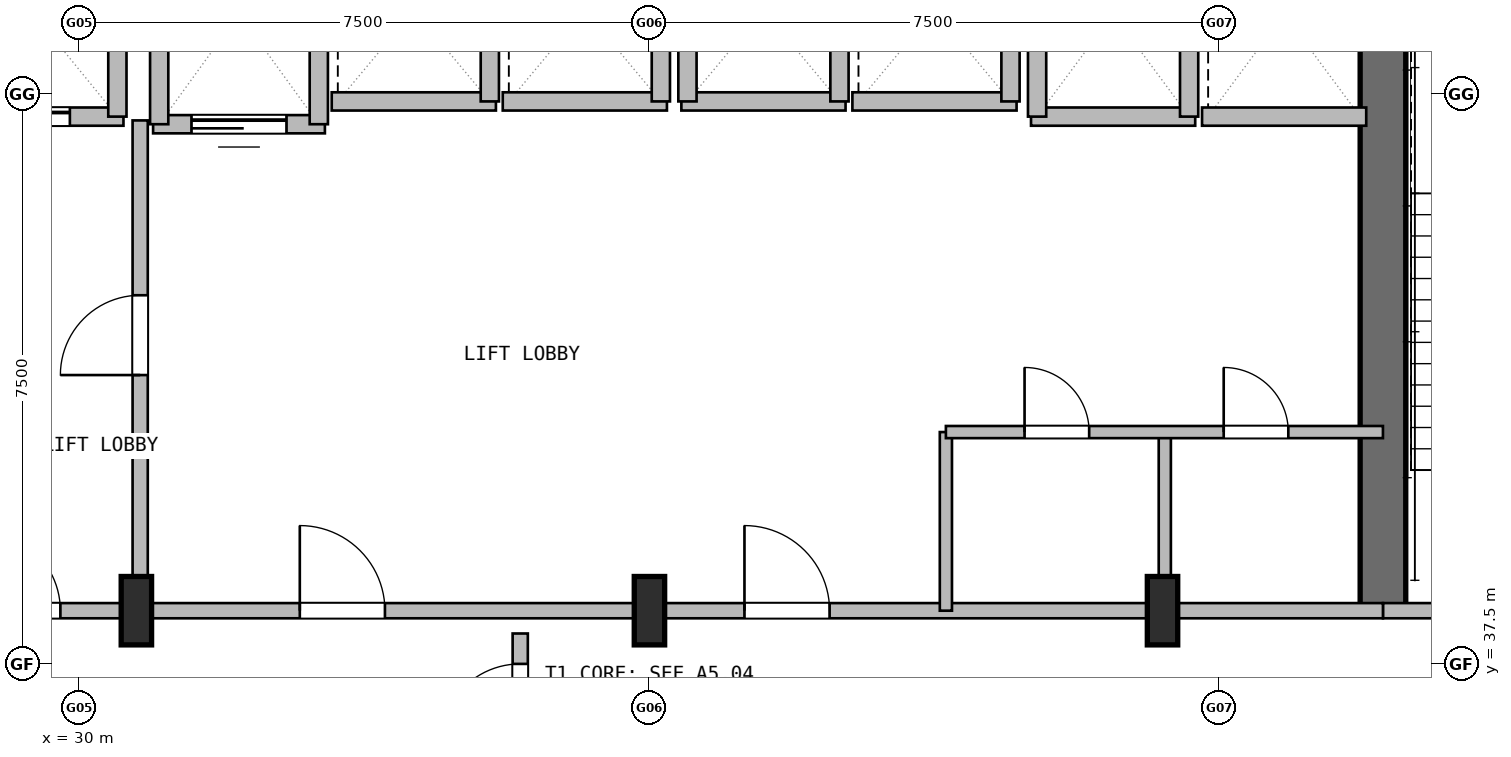
"""IFC4 building model, lengths in metres.
Left out: names, types, materials, properties, quantities, classifications, styles, units other than length and angle.
Written with IfcOpenShell. Run it as: python <this file> out.ifc"""

import sys

from ifc_helpers import new_model, si_unit, direction, frame, frame_2d, origin, origin_2d, place, context, subcontext, project, spatial, rectangle, i_section, extrude, element, fill, save


model = new_model("IFC4")
c1 = context("Model", 3, precision=1e-05, world=origin(), true_north=direction((0.0, 1.0)))
c2 = subcontext(c1, "Body", "Model", "MODEL_VIEW")
j1 = project(units=[si_unit("LENGTHUNIT", "METRE"), si_unit("PLANEANGLEUNIT", "RADIAN")], contexts=[c1])
p1 = place(None, origin())
s1 = spatial("IfcSite", under=j1, at=p1, CompositionType="ELEMENT")
p2 = place(p1, origin())
s2 = spatial("IfcBuilding", under=s1, at=p2, CompositionType="ELEMENT")
p3 = place(p2, frame((0.0, 0.0, 81.9)))
s3 = spatial("IfcBuildingStorey", under=s2, at=p3, CompositionType="ELEMENT", Elevation=81.9)
p4 = place(p3, frame((47.15, 38.2, 0.0), z_axis=(0.0, 0.0, 1.0), x_axis=(0.0, 1.0, 0.0)))
e1 = element("IfcWall", 1, at=p4, inside=s3, PredefinedType="SHEAR", context=c2, shape_type="SweptSolid", body=[
    extrude(rectangle(XDim=9.8, YDim=0.6, at=frame_2d((4.9, 0.0))), origin(), (0.0, 0.0, 1.0), 4.8),
])
for number, where, z_axis, x_axis in (
    (2, (30.75, 38.2, 0.0), (0.0, 0.0, 1.0), (1.0, 0.0, 0.0)),
    (3, (37.5, 38.2, 0.0), (0.0, 0.0, 1.0), (1.0, 0.0, 0.0)),
    (4, (44.25, 38.2, 0.0), (0.0, 0.0, 1.0), (1.0, 0.0, 0.0)),
):
    element("IfcColumn", number, at=place(p3, frame(where, z_axis=z_axis, x_axis=x_axis)), inside=s3, PredefinedType="COLUMN", context=c2, shape_type="SweptSolid", body=[
        extrude(i_section(OverallWidth=0.4, OverallDepth=0.9, WebThickness=0.02, FlangeThickness=0.036, at=origin_2d()), origin(), (0.0, 0.0, 1.0), 4.8),
    ])
p5 = place(p3, frame((47.15, 38.2, 0.0), z_axis=(0.0, 0.0, 1.0), x_axis=(1.0, 0.0, 0.0)))
e5 = element("IfcWall", 5, at=p5, inside=s3, PredefinedType="PARTITIONING", context=c2, shape_type="SweptSolid", body=[
    extrude(rectangle(XDim=3.85, YDim=0.2, at=frame_2d((1.925, 0.0))), origin(), (0.0, 0.0, 1.0), 3.83),
])
p6 = place(p5, frame((0.75, 0.0, 0.0)))
e6 = element("IfcOpeningElement", 6, at=p6, cuts=e5, PredefinedType="OPENING", context=c2, shape_type="SweptSolid", body=[
    extrude(rectangle(XDim=1.12, YDim=2.1, at=frame_2d((0.56, 1.05))), frame((0.0, 0.11, 0.0), z_axis=(0.0, -1.0, 0.0), x_axis=(1.0, 0.0, 0.0)), (0.0, 0.0, 1.0), 0.22),
])
p7 = place(p3, frame((30.8, 38.2, 0.0), z_axis=(0.0, 0.0, 1.0), x_axis=(0.0, 1.0, 0.0)))
e7 = element("IfcWall", 7, at=p7, inside=s3, PredefinedType="PARTITIONING", context=c2, shape_type="SweptSolid", body=[
    extrude(rectangle(XDim=6.45, YDim=0.2, at=frame_2d((3.225, 0.0))), origin(), (0.0, 0.0, 1.0), 3.83),
])
p8 = place(p7, frame((3.1, 0.0, 0.0)))
e8 = element("IfcOpeningElement", 8, at=p8, cuts=e7, PredefinedType="OPENING", context=c2, shape_type="SweptSolid", body=[
    extrude(rectangle(XDim=1.05, YDim=2.1, at=frame_2d((0.525, 1.05))), frame((0.0, 0.11, 0.0), z_axis=(0.0, -1.0, 0.0), x_axis=(1.0, 0.0, 0.0)), (0.0, 0.0, 1.0), 0.22),
])
p9 = place(p3, frame((27.95, 38.2, 0.0), z_axis=(0.0, 0.0, 1.0), x_axis=(1.0, 0.0, 0.0)))
e9 = element("IfcWall", 9, at=p9, inside=s3, PredefinedType="PARTITIONING", context=c2, shape_type="SweptSolid", body=[
    extrude(rectangle(XDim=2.85, YDim=0.2, at=frame_2d((1.425, 0.0))), origin(), (0.0, 0.0, 1.0), 3.83),
])
p10 = place(p9, frame((0.75, 0.0, 0.0)))
e10 = element("IfcOpeningElement", 10, at=p10, cuts=e9, PredefinedType="OPENING", context=c2, shape_type="SweptSolid", body=[
    extrude(rectangle(XDim=1.05, YDim=2.1, at=frame_2d((0.525, 1.05))), frame((0.0, 0.11, 0.0), z_axis=(0.0, -1.0, 0.0), x_axis=(1.0, 0.0, 0.0)), (0.0, 0.0, 1.0), 0.22),
])
p11 = place(p3, frame((30.8, 38.2, 0.0), z_axis=(0.0, 0.0, 1.0), x_axis=(1.0, 0.0, 0.0)))
e11 = element("IfcWall", 11, at=p11, inside=s3, PredefinedType="PARTITIONING", context=c2, shape_type="SweptSolid", body=[
    extrude(rectangle(XDim=16.35, YDim=0.2, at=frame_2d((8.175, 0.0))), origin(), (0.0, 0.0, 1.0), 3.83),
])
p12 = place(p11, frame((2.1, 0.0, 0.0)))
e12 = element("IfcOpeningElement", 12, at=p12, cuts=e11, PredefinedType="OPENING", context=c2, shape_type="SweptSolid", body=[
    extrude(rectangle(XDim=1.12, YDim=2.1, at=frame_2d((0.56, 1.05))), frame((0.0, 0.11, 0.0), z_axis=(0.0, -1.0, 0.0), x_axis=(1.0, 0.0, 0.0)), (0.0, 0.0, 1.0), 0.22),
])
p13 = place(p11, frame((7.95, 0.0, 0.0)))
e13 = element("IfcOpeningElement", 13, at=p13, cuts=e11, PredefinedType="OPENING", context=c2, shape_type="SweptSolid", body=[
    extrude(rectangle(XDim=1.12, YDim=2.1, at=frame_2d((0.56, 1.05))), frame((0.0, 0.11, 0.0), z_axis=(0.0, -1.0, 0.0), x_axis=(1.0, 0.0, 0.0)), (0.0, 0.0, 1.0), 0.22),
])
p14 = place(p3, frame((28.22, 44.7, 0.0), z_axis=(0.0, 0.0, 1.0), x_axis=(1.0, 0.0, 0.0)))
e14 = element("IfcWall", 14, at=p14, inside=s3, PredefinedType="PARTITIONING", context=c2, shape_type="SweptSolid", body=[
    extrude(rectangle(XDim=2.36, YDim=0.24, at=frame_2d((1.18, 0.0))), origin(), (0.0, 0.0, 1.0), 4.23),
])
p15 = place(p14, frame((0.705, 0.0, 0.0)))
e15 = element("IfcOpeningElement", 15, at=p15, cuts=e14, PredefinedType="OPENING", context=c2, shape_type="SweptSolid", body=[
    extrude(rectangle(XDim=0.95, YDim=2.15, at=frame_2d((0.475, 1.075))), frame((0.0, 0.13, 0.0), z_axis=(0.0, -1.0, 0.0), x_axis=(1.0, 0.0, 0.0)), (0.0, 0.0, 1.0), 0.26),
])
p16 = place(p3, frame((30.5, 44.7, 0.0), z_axis=(0.0, 0.0, 1.0), x_axis=(0.0, 1.0, 0.0)))
e16 = element("IfcWall", 16, at=p16, inside=s3, PredefinedType="PARTITIONING", context=c2, shape_type="SweptSolid", body=[
    extrude(rectangle(XDim=2.7, YDim=0.24, at=frame_2d((1.35, 0.0))), origin(), (0.0, 0.0, 1.0), 3.83),
])
p17 = place(p3, frame((30.97, 44.6, 0.0), z_axis=(0.0, 0.0, 1.0), x_axis=(1.0, 0.0, 0.0)))
e17 = element("IfcWall", 17, at=p17, inside=s3, PredefinedType="PARTITIONING", context=c2, shape_type="SweptSolid", body=[
    extrude(rectangle(XDim=2.26, YDim=0.24, at=frame_2d((1.13, 0.0))), origin(), (0.0, 0.0, 1.0), 4.53),
])
p18 = place(p17, frame((0.505, 0.0, 0.0)))
e18 = element("IfcOpeningElement", 18, at=p18, cuts=e17, PredefinedType="OPENING", context=c2, shape_type="SweptSolid", body=[
    extrude(rectangle(XDim=1.25, YDim=2.2, at=frame_2d((0.625, 1.1))), frame((0.0, 0.13, 0.0), z_axis=(0.0, -1.0, 0.0), x_axis=(1.0, 0.0, 0.0)), (0.0, 0.0, 1.0), 0.26),
])
for number, where, z_axis, x_axis in (
    (19, (31.05, 44.6, 0.0), (0.0, 0.0, 1.0), (0.0, 1.0, 0.0)),
    (20, (33.15, 44.6, 0.0), (0.0, 0.0, 1.0), (0.0, 1.0, 0.0)),
):
    element("IfcWall", number, at=place(p3, frame(where, z_axis=z_axis, x_axis=x_axis)), inside=s3, PredefinedType="PARTITIONING", context=c2, shape_type="SweptSolid", body=[
        extrude(rectangle(XDim=2.9, YDim=0.24, at=frame_2d((1.45, 0.0))), origin(), (0.0, 0.0, 1.0), 4.53),
    ])
p19 = place(p3, frame((33.32, 44.9, 0.0), z_axis=(0.0, 0.0, 1.0), x_axis=(1.0, 0.0, 0.0)))
e21 = element("IfcWall", 21, at=p19, inside=s3, PredefinedType="PARTITIONING", context=c2, shape_type="SweptSolid", body=[
    extrude(rectangle(XDim=2.16, YDim=0.24, at=frame_2d((1.08, 0.0))), origin(), (0.0, 0.0, 1.0), 4.53),
])
p20 = place(p3, frame((35.4, 44.9, 0.0), z_axis=(0.0, 0.0, 1.0), x_axis=(0.0, 1.0, 0.0)))
e22 = element("IfcWall", 22, at=p20, inside=s3, PredefinedType="PARTITIONING", context=c2, shape_type="SweptSolid", body=[
    extrude(rectangle(XDim=2.4, YDim=0.24, at=frame_2d((1.2, 0.0))), origin(), (0.0, 0.0, 1.0), 4.53),
])
p21 = place(p3, frame((35.57, 44.9, 0.0), z_axis=(0.0, 0.0, 1.0), x_axis=(1.0, 0.0, 0.0)))
e23 = element("IfcWall", 23, at=p21, inside=s3, PredefinedType="PARTITIONING", context=c2, shape_type="SweptSolid", body=[
    extrude(rectangle(XDim=2.16, YDim=0.24, at=frame_2d((1.08, 0.0))), origin(), (0.0, 0.0, 1.0), 4.53),
])
p22 = place(p3, frame((37.65, 44.9, 0.0), z_axis=(0.0, 0.0, 1.0), x_axis=(0.0, 1.0, 0.0)))
e24 = element("IfcWall", 24, at=p22, inside=s3, PredefinedType="PARTITIONING", context=c2, shape_type="SweptSolid", body=[
    extrude(rectangle(XDim=2.4, YDim=0.24, at=frame_2d((1.2, 0.0))), origin(), (0.0, 0.0, 1.0), 4.53),
])
p23 = place(p3, frame((37.92, 44.9, 0.0), z_axis=(0.0, 0.0, 1.0), x_axis=(1.0, 0.0, 0.0)))
e25 = element("IfcWall", 25, at=p23, inside=s3, PredefinedType="PARTITIONING", context=c2, shape_type="SweptSolid", body=[
    extrude(rectangle(XDim=2.16, YDim=0.24, at=frame_2d((1.08, 0.0))), origin(), (0.0, 0.0, 1.0), 4.53),
])
for number, where, z_axis, x_axis in (
    (26, (38.0, 44.9, 0.0), (0.0, 0.0, 1.0), (0.0, 1.0, 0.0)),
    (27, (40.0, 44.9, 0.0), (0.0, 0.0, 1.0), (0.0, 1.0, 0.0)),
):
    element("IfcWall", number, at=place(p3, frame(where, z_axis=z_axis, x_axis=x_axis)), inside=s3, PredefinedType="PARTITIONING", context=c2, shape_type="SweptSolid", body=[
        extrude(rectangle(XDim=2.4, YDim=0.24, at=frame_2d((1.2, 0.0))), origin(), (0.0, 0.0, 1.0), 4.53),
    ])
p24 = place(p3, frame((40.17, 44.9, 0.0), z_axis=(0.0, 0.0, 1.0), x_axis=(1.0, 0.0, 0.0)))
e28 = element("IfcWall", 28, at=p24, inside=s3, PredefinedType="PARTITIONING", context=c2, shape_type="SweptSolid", body=[
    extrude(rectangle(XDim=2.16, YDim=0.24, at=frame_2d((1.08, 0.0))), origin(), (0.0, 0.0, 1.0), 4.53),
])
p25 = place(p3, frame((42.25, 44.9, 0.0), z_axis=(0.0, 0.0, 1.0), x_axis=(0.0, 1.0, 0.0)))
e29 = element("IfcWall", 29, at=p25, inside=s3, PredefinedType="PARTITIONING", context=c2, shape_type="SweptSolid", body=[
    extrude(rectangle(XDim=2.4, YDim=0.24, at=frame_2d((1.2, 0.0))), origin(), (0.0, 0.0, 1.0), 4.53),
])
p26 = place(p3, frame((42.52, 44.7, 0.0), z_axis=(0.0, 0.0, 1.0), x_axis=(1.0, 0.0, 0.0)))
e30 = element("IfcWall", 30, at=p26, inside=s3, PredefinedType="PARTITIONING", context=c2, shape_type="SweptSolid", body=[
    extrude(rectangle(XDim=2.16, YDim=0.24, at=frame_2d((1.08, 0.0))), origin(), (0.0, 0.0, 1.0), 4.53),
])
for number, where, z_axis, x_axis in (
    (31, (42.6, 44.7, 0.0), (0.0, 0.0, 1.0), (0.0, 1.0, 0.0)),
    (32, (44.6, 44.7, 0.0), (0.0, 0.0, 1.0), (0.0, 1.0, 0.0)),
):
    element("IfcWall", number, at=place(p3, frame(where, z_axis=z_axis, x_axis=x_axis)), inside=s3, PredefinedType="PARTITIONING", context=c2, shape_type="SweptSolid", body=[
        extrude(rectangle(XDim=2.7, YDim=0.24, at=frame_2d((1.35, 0.0))), origin(), (0.0, 0.0, 1.0), 4.53),
    ])
p27 = place(p3, frame((44.77, 44.7, 0.0), z_axis=(0.0, 0.0, 1.0), x_axis=(1.0, 0.0, 0.0)))
e33 = element("IfcWall", 33, at=p27, inside=s3, PredefinedType="PARTITIONING", context=c2, shape_type="SweptSolid", body=[
    extrude(rectangle(XDim=2.16, YDim=0.24, at=frame_2d((1.08, 0.0))), origin(), (0.0, 0.0, 1.0), 4.53),
])
for number, where, z_axis, x_axis in (
    (34, (41.4, 38.2, 0.0), (0.0, 0.0, 1.0), (0.0, 1.0, 0.0)),
    (35, (44.28, 38.2, 0.0), (0.0, 0.0, 1.0), (0.0, 1.0, 0.0)),
):
    element("IfcWall", number, at=place(p3, frame(where, z_axis=z_axis, x_axis=x_axis)), inside=s3, PredefinedType="PARTITIONING", context=c2, shape_type="SweptSolid", body=[
        extrude(rectangle(XDim=2.35, YDim=0.16, at=frame_2d((1.175, 0.0))), origin(), (0.0, 0.0, 1.0), 4.53),
    ])
p28 = place(p3, frame((41.4, 40.55, 0.0), z_axis=(0.0, 0.0, 1.0), x_axis=(1.0, 0.0, 0.0)))
e36 = element("IfcWall", 36, at=p28, inside=s3, PredefinedType="PARTITIONING", context=c2, shape_type="SweptSolid", body=[
    extrude(rectangle(XDim=5.75, YDim=0.16, at=frame_2d((2.875, 0.0))), origin(), (0.0, 0.0, 1.0), 4.53),
])
p29 = place(p28, frame((1.035, 0.0, 0.0)))
e37 = element("IfcOpeningElement", 37, at=p29, cuts=e36, PredefinedType="OPENING", context=c2, shape_type="SweptSolid", body=[
    extrude(rectangle(XDim=0.85, YDim=2.05, at=frame_2d((0.425, 1.025))), frame((0.0, 0.09, 0.0), z_axis=(0.0, -1.0, 0.0), x_axis=(1.0, 0.0, 0.0)), (0.0, 0.0, 1.0), 0.18),
])
p30 = place(p28, frame((3.655, 0.0, 0.0)))
e38 = element("IfcOpeningElement", 38, at=p30, cuts=e36, PredefinedType="OPENING", context=c2, shape_type="SweptSolid", body=[
    extrude(rectangle(XDim=0.85, YDim=2.05, at=frame_2d((0.425, 1.025))), frame((0.0, 0.09, 0.0), z_axis=(0.0, -1.0, 0.0), x_axis=(1.0, 0.0, 0.0)), (0.0, 0.0, 1.0), 0.18),
])
p31 = place(p3, frame((35.8, 17.0, 0.0), z_axis=(0.0, 0.0, 1.0), x_axis=(0.0, 1.0, 0.0)))
e39 = element("IfcWall", 39, at=p31, inside=s3, PredefinedType="PARTITIONING", context=c2, shape_type="SweptSolid", body=[
    extrude(rectangle(XDim=20.9, YDim=0.2, at=frame_2d((10.45, 0.0))), origin(), (0.0, 0.0, 1.0), 4.53),
])
p32 = place(p31, frame((19.45, 0.0, 0.0)))
e40 = element("IfcOpeningElement", 40, at=p32, cuts=e39, PredefinedType="OPENING", context=c2, shape_type="SweptSolid", body=[
    extrude(rectangle(XDim=1.05, YDim=2.1, at=frame_2d((0.525, 1.05))), frame((0.0, 0.11, 0.0), z_axis=(0.0, -1.0, 0.0), x_axis=(1.0, 0.0, 0.0)), (0.0, 0.0, 1.0), 0.22),
])
p33 = place(p8, origin())
e41 = element("IfcDoor", 41, at=p33, inside=s3, OperationType="SINGLE_SWING_LEFT", PredefinedType="DOOR", context=c2, shape_type="SweptSolid", body=[
    extrude(rectangle(XDim=1.05, YDim=2.1, at=frame_2d((0.525, 1.05))), frame((0.0, 0.025, 0.0), z_axis=(0.0, -1.0, 0.0), x_axis=(1.0, 0.0, 0.0)), (0.0, 0.0, 1.0), 0.05),
])
fill(e8, e41)
p34 = place(p10, origin())
e42 = element("IfcDoor", 42, at=p34, inside=s3, OperationType="SINGLE_SWING_RIGHT", PredefinedType="DOOR", context=c2, shape_type="SweptSolid", body=[
    extrude(rectangle(XDim=1.05, YDim=2.1, at=frame_2d((0.525, 1.05))), frame((0.0, 0.025, 0.0), z_axis=(0.0, -1.0, 0.0), x_axis=(1.0, 0.0, 0.0)), (0.0, 0.0, 1.0), 0.05),
])
fill(e10, e42)
p35 = place(p12, origin())
e43 = element("IfcDoor", 43, at=p35, inside=s3, OperationType="SINGLE_SWING_LEFT", PredefinedType="DOOR", context=c2, shape_type="SweptSolid", body=[
    extrude(rectangle(XDim=1.12, YDim=2.1, at=frame_2d((0.56, 1.05))), frame((0.0, 0.025, 0.0), z_axis=(0.0, -1.0, 0.0), x_axis=(1.0, 0.0, 0.0)), (0.0, 0.0, 1.0), 0.05),
])
fill(e12, e43)
p36 = place(p13, origin())
e44 = element("IfcDoor", 44, at=p36, inside=s3, OperationType="SINGLE_SWING_RIGHT", PredefinedType="DOOR", context=c2, shape_type="SweptSolid", body=[
    extrude(rectangle(XDim=1.12, YDim=2.1, at=frame_2d((0.56, 1.05))), frame((0.0, 0.025, 0.0), z_axis=(0.0, -1.0, 0.0), x_axis=(1.0, 0.0, 0.0)), (0.0, 0.0, 1.0), 0.05),
])
fill(e13, e44)
p37 = place(p15, origin())
e45 = element("IfcDoor", 45, at=p37, inside=s3, OperationType="SLIDING_TO_LEFT", PredefinedType="DOOR", context=c2, shape_type="SweptSolid", body=[
    extrude(rectangle(XDim=0.95, YDim=2.15, at=frame_2d((0.475, 1.075))), frame((0.0, 0.025, 0.0), z_axis=(0.0, -1.0, 0.0), x_axis=(1.0, 0.0, 0.0)), (0.0, 0.0, 1.0), 0.05),
])
fill(e15, e45)
p38 = place(p18, origin())
e46 = element("IfcDoor", 46, at=p38, inside=s3, OperationType="SLIDING_TO_LEFT", PredefinedType="DOOR", context=c2, shape_type="SweptSolid", body=[
    extrude(rectangle(XDim=1.25, YDim=2.2, at=frame_2d((0.625, 1.1))), frame((0.0, 0.025, 0.0), z_axis=(0.0, -1.0, 0.0), x_axis=(1.0, 0.0, 0.0)), (0.0, 0.0, 1.0), 0.05),
])
fill(e18, e46)
p39 = place(p29, origin())
e47 = element("IfcDoor", 47, at=p39, inside=s3, OperationType="SINGLE_SWING_RIGHT", PredefinedType="DOOR", context=c2, shape_type="SweptSolid", body=[
    extrude(rectangle(XDim=0.85, YDim=2.05, at=frame_2d((0.425, 1.025))), frame((0.0, 0.025, 0.0), z_axis=(0.0, -1.0, 0.0), x_axis=(1.0, 0.0, 0.0)), (0.0, 0.0, 1.0), 0.05),
])
fill(e37, e47)
p40 = place(p30, origin())
e48 = element("IfcDoor", 48, at=p40, inside=s3, OperationType="SINGLE_SWING_LEFT", PredefinedType="DOOR", context=c2, shape_type="SweptSolid", body=[
    extrude(rectangle(XDim=0.85, YDim=2.05, at=frame_2d((0.425, 1.025))), frame((0.0, 0.025, 0.0), z_axis=(0.0, -1.0, 0.0), x_axis=(1.0, 0.0, 0.0)), (0.0, 0.0, 1.0), 0.05),
])
fill(e38, e48)
p41 = place(p32, origin())
e49 = element("IfcDoor", 49, at=p41, inside=s3, OperationType="SINGLE_SWING_LEFT", PredefinedType="DOOR", context=c2, shape_type="SweptSolid", body=[
    extrude(rectangle(XDim=1.05, YDim=2.1, at=frame_2d((0.525, 1.05))), frame((0.0, 0.025, 0.0), z_axis=(0.0, -1.0, 0.0), x_axis=(1.0, 0.0, 0.0)), (0.0, 0.0, 1.0), 0.05),
])
fill(e40, e49)
save(model, sys.argv[1])
